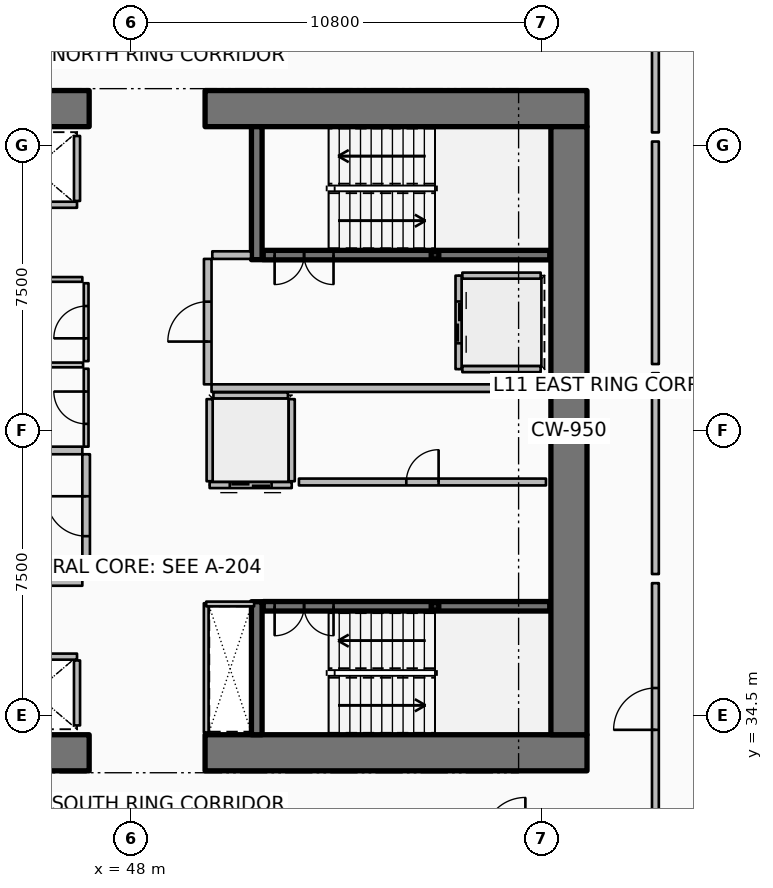
"""IFC4 building model, lengths in metres.
Left out: names, types, materials, properties, quantities, classifications, styles, units other than length and angle.
Written with IfcOpenShell. Run it as: python <this file> out.ifc"""

import sys

from ifc_helpers import new_model, si_unit, direction, frame, frame_2d, origin, origin_2d, place, context, subcontext, project, spatial, rectangle, hollow_rectangle, extrude, element, fill, save


model = new_model("IFC4")
c1 = context("Model", 3, precision=1e-05, world=origin(), true_north=direction((0.0, 1.0)))
c2 = subcontext(c1, "Body", "Model", "MODEL_VIEW")
j1 = project(units=[si_unit("LENGTHUNIT", "METRE"), si_unit("PLANEANGLEUNIT", "RADIAN")], contexts=[c1])
p1 = place(None, origin())
s1 = spatial("IfcSite", under=j1, at=p1, CompositionType="ELEMENT")
p2 = place(p1, origin())
s2 = spatial("IfcBuilding", under=s1, at=p2, CompositionType="ELEMENT")
p3 = place(p2, frame((0.0, 0.0, 48.9)))
s3 = spatial("IfcBuildingStorey", under=s2, at=p3, CompositionType="ELEMENT", Elevation=48.9)
p4 = place(p3, frame((36.85, 33.525, 0.0), z_axis=(0.0, 0.0, 1.0), x_axis=(1.0, 0.0, 0.0)))
e1 = element("IfcWall", 1, at=p4, inside=s3, PredefinedType="SHEAR", context=c2, shape_type="SweptSolid", body=[
    extrude(rectangle(XDim=10.05, YDim=0.95, at=frame_2d((5.025, 0.0))), origin(), (0.0, 0.0, 1.0), 3.75),
])
p5 = place(p3, frame((49.95, 33.525, 0.0), z_axis=(0.0, 0.0, 1.0), x_axis=(1.0, 0.0, 0.0)))
e2 = element("IfcWall", 2, at=p5, inside=s3, PredefinedType="SHEAR", context=c2, shape_type="SweptSolid", body=[
    extrude(rectangle(XDim=10.05, YDim=0.95, at=frame_2d((5.025, 0.0))), origin(), (0.0, 0.0, 1.0), 3.75),
])
p6 = place(p3, frame((36.85, 50.475, 0.0), z_axis=(0.0, 0.0, 1.0), x_axis=(1.0, 0.0, 0.0)))
e3 = element("IfcWall", 3, at=p6, inside=s3, PredefinedType="SHEAR", context=c2, shape_type="SweptSolid", body=[
    extrude(rectangle(XDim=10.05, YDim=0.95, at=frame_2d((5.025, 0.0))), origin(), (0.0, 0.0, 1.0), 3.75),
])
p7 = place(p3, frame((49.95, 50.475, 0.0), z_axis=(0.0, 0.0, 1.0), x_axis=(1.0, 0.0, 0.0)))
e4 = element("IfcWall", 4, at=p7, inside=s3, PredefinedType="SHEAR", context=c2, shape_type="SweptSolid", body=[
    extrude(rectangle(XDim=10.05, YDim=0.95, at=frame_2d((5.025, 0.0))), origin(), (0.0, 0.0, 1.0), 3.75),
])
p8 = place(p3, frame((59.525, 34.0, 0.0), z_axis=(0.0, 0.0, 1.0), x_axis=(0.0, 1.0, 0.0)))
e5 = element("IfcWall", 5, at=p8, inside=s3, PredefinedType="SHEAR", context=c2, shape_type="SweptSolid", body=[
    extrude(rectangle(XDim=16.0, YDim=0.95, at=frame_2d((8.0, 0.0))), origin(), (0.0, 0.0, 1.0), 3.75),
])
for number, where, z_axis, x_axis in (
    (6, (51.31, 46.5, 0.0), (0.0, 0.0, 1.0), (0.0, 1.0, 0.0)),
    (7, (51.31, 34.0, 0.0), (0.0, 0.0, 1.0), (0.0, 1.0, 0.0)),
):
    element("IfcWall", number, at=place(p3, frame(where, z_axis=z_axis, x_axis=x_axis)), inside=s3, PredefinedType="SHEAR", context=c2, shape_type="SweptSolid", body=[
        extrude(rectangle(XDim=3.5, YDim=0.28, at=frame_2d((1.75, 0.0))), origin(), (0.0, 0.0, 1.0), 3.75),
    ])
for number, where, z_axis, x_axis in (
    (8, (56.0, 46.62, 0.0), (0.0, 0.0, 1.0), (1.0, 0.0, 0.0)),
    (9, (56.0, 37.38, 0.0), (0.0, 0.0, 1.0), (1.0, 0.0, 0.0)),
):
    element("IfcColumn", number, at=place(p3, frame(where, z_axis=z_axis, x_axis=x_axis)), inside=s3, PredefinedType="COLUMN", context=c2, shape_type="SweptSolid", body=[
        extrude(hollow_rectangle(XDim=0.2, YDim=0.2, WallThickness=0.01, InnerFilletRadius=0.01, OuterFilletRadius=0.02, at=origin_2d()), origin(), (0.0, 0.0, 1.0), 1.67),
    ])
p9 = place(p3, frame((51.48, 46.62, 0.0), z_axis=(0.0, 0.0, 1.0), x_axis=(1.0, 0.0, 0.0)))
e10 = element("IfcWall", 10, at=p9, inside=s3, PredefinedType="SOLIDWALL", context=c2, shape_type="SweptSolid", body=[
    extrude(rectangle(XDim=7.54, YDim=0.25, at=frame_2d((3.77, 0.0))), origin(), (0.0, 0.0, 1.0), 3.5),
])
p10 = place(p9, frame((0.3, 0.0, 0.0)))
e11 = element("IfcOpeningElement", 11, at=p10, cuts=e10, PredefinedType="OPENING", context=c2, shape_type="SweptSolid", body=[
    extrude(rectangle(XDim=1.55, YDim=2.15, at=frame_2d((0.775, 1.075))), frame((0.0, 0.135, 0.0), z_axis=(0.0, -1.0, 0.0), x_axis=(1.0, 0.0, 0.0)), (0.0, 0.0, 1.0), 0.27),
])
p11 = place(p3, frame((51.48, 37.38, 0.0), z_axis=(0.0, 0.0, 1.0), x_axis=(1.0, 0.0, 0.0)))
e12 = element("IfcWall", 12, at=p11, inside=s3, PredefinedType="SOLIDWALL", context=c2, shape_type="SweptSolid", body=[
    extrude(rectangle(XDim=7.54, YDim=0.25, at=frame_2d((3.77, 0.0))), origin(), (0.0, 0.0, 1.0), 3.5),
])
p12 = place(p11, frame((0.3, 0.0, 0.0)))
e13 = element("IfcOpeningElement", 13, at=p12, cuts=e12, PredefinedType="OPENING", context=c2, shape_type="SweptSolid", body=[
    extrude(rectangle(XDim=1.55, YDim=2.15, at=frame_2d((0.775, 1.075))), frame((0.0, 0.135, 0.0), z_axis=(0.0, -1.0, 0.0), x_axis=(1.0, 0.0, 0.0)), (0.0, 0.0, 1.0), 0.27),
])
p13 = place(p3, frame((46.58, 47.945, 0.0), z_axis=(0.0, 0.0, 1.0), x_axis=(-1.0, 0.0, 0.0)))
e14 = element("IfcWall", 14, at=p13, inside=s3, PredefinedType="PARTITIONING", context=c2, shape_type="SweptSolid", body=[
    extrude(rectangle(XDim=2.26, YDim=0.16, at=frame_2d((1.13, 0.0))), origin(), (0.0, 0.0, 1.0), 3.5),
])
p14 = place(p3, frame((46.58, 48.045, 0.0), z_axis=(0.0, 0.0, 1.0), x_axis=(0.0, 1.0, 0.0)))
e15 = element("IfcWall", 15, at=p14, inside=s3, PredefinedType="PARTITIONING", context=c2, shape_type="SweptSolid", body=[
    extrude(rectangle(XDim=1.71, YDim=0.16, at=frame_2d((0.855, 0.0))), origin(), (0.0, 0.0, 1.0), 3.5),
])
p15 = place(p3, frame((44.32, 36.055, 0.0), z_axis=(0.0, 0.0, 1.0), x_axis=(1.0, 0.0, 0.0)))
e16 = element("IfcWall", 16, at=p15, inside=s3, PredefinedType="PARTITIONING", context=c2, shape_type="SweptSolid", body=[
    extrude(rectangle(XDim=2.26, YDim=0.16, at=frame_2d((1.13, 0.0))), origin(), (0.0, 0.0, 1.0), 3.5),
])
p16 = place(p3, frame((46.58, 34.245, 0.0), z_axis=(0.0, 0.0, 1.0), x_axis=(0.0, 1.0, 0.0)))
e17 = element("IfcWall", 17, at=p16, inside=s3, PredefinedType="PARTITIONING", context=c2, shape_type="SweptSolid", body=[
    extrude(rectangle(XDim=1.71, YDim=0.16, at=frame_2d((0.855, 0.0))), origin(), (0.0, 0.0, 1.0), 3.5),
])
p17 = place(p3, frame((56.62, 46.08, 0.0), z_axis=(0.0, 0.0, 1.0), x_axis=(0.0, -1.0, 0.0)))
e18 = element("IfcWall", 18, at=p17, inside=s3, PredefinedType="PARTITIONING", context=c2, shape_type="SweptSolid", body=[
    extrude(rectangle(XDim=2.46, YDim=0.16, at=frame_2d((1.23, 0.0))), origin(), (0.0, 0.0, 1.0), 3.5),
])
p18 = place(p17, frame((0.68, 0.0, 0.0)))
e19 = element("IfcOpeningElement", 19, at=p18, cuts=e18, PredefinedType="OPENING", context=c2, shape_type="SweptSolid", body=[
    extrude(rectangle(XDim=1.1, YDim=2.1, at=frame_2d((0.55, 1.05))), frame((0.0, 0.09, 0.0), z_axis=(0.0, -1.0, 0.0), x_axis=(1.0, 0.0, 0.0)), (0.0, 0.0, 1.0), 0.18),
])
for number, where, z_axis, x_axis in (
    (20, (56.72, 46.08, 0.0), (0.0, 0.0, 1.0), (1.0, 0.0, 0.0)),
    (21, (56.72, 43.62, 0.0), (0.0, 0.0, 1.0), (1.0, 0.0, 0.0)),
):
    element("IfcWall", number, at=place(p3, frame(where, z_axis=z_axis, x_axis=x_axis)), inside=s3, PredefinedType="PARTITIONING", context=c2, shape_type="SweptSolid", body=[
        extrude(rectangle(XDim=2.06, YDim=0.16, at=frame_2d((1.03, 0.0))), origin(), (0.0, 0.0, 1.0), 3.5),
    ])
p19 = place(p3, frame((52.23, 40.57, 0.0), z_axis=(0.0, 0.0, 1.0), x_axis=(-1.0, 0.0, 0.0)))
e22 = element("IfcWall", 22, at=p19, inside=s3, PredefinedType="PARTITIONING", context=c2, shape_type="SweptSolid", body=[
    extrude(rectangle(XDim=2.16, YDim=0.16, at=frame_2d((1.08, 0.0))), origin(), (0.0, 0.0, 1.0), 3.5),
])
p20 = place(p19, frame((0.53, 0.0, 0.0)))
e23 = element("IfcOpeningElement", 23, at=p20, cuts=e22, PredefinedType="OPENING", context=c2, shape_type="SweptSolid", body=[
    extrude(rectangle(XDim=1.1, YDim=2.1, at=frame_2d((0.55, 1.05))), frame((0.0, 0.09, 0.0), z_axis=(0.0, -1.0, 0.0), x_axis=(1.0, 0.0, 0.0)), (0.0, 0.0, 1.0), 0.18),
])
for number, where, z_axis, x_axis in (
    (24, (52.23, 40.67, 0.0), (0.0, 0.0, 1.0), (0.0, 1.0, 0.0)),
    (25, (50.07, 40.67, 0.0), (0.0, 0.0, 1.0), (0.0, 1.0, 0.0)),
):
    element("IfcWall", number, at=place(p3, frame(where, z_axis=z_axis, x_axis=x_axis)), inside=s3, PredefinedType="PARTITIONING", context=c2, shape_type="SweptSolid", body=[
        extrude(rectangle(XDim=2.16, YDim=0.16, at=frame_2d((1.08, 0.0))), origin(), (0.0, 0.0, 1.0), 3.5),
    ])
p21 = place(p3, frame((50.17, 42.93, 0.0), z_axis=(0.0, 0.0, 1.0), x_axis=(1.0, 0.0, 0.0)))
e26 = element("IfcWall", 26, at=p21, inside=s3, PredefinedType="PARTITIONING", context=c2, shape_type="SweptSolid", body=[
    extrude(rectangle(XDim=1.96, YDim=0.16, at=frame_2d((0.98, 0.0))), origin(), (0.0, 0.0, 1.0), 3.5),
])
p22 = place(p3, frame((52.42, 40.65, 0.0), z_axis=(0.0, 0.0, 1.0), x_axis=(1.0, 0.0, 0.0)))
e27 = element("IfcWall", 27, at=p22, inside=s3, PredefinedType="PARTITIONING", context=c2, shape_type="SweptSolid", body=[
    extrude(rectangle(XDim=6.5, YDim=0.18, at=frame_2d((3.25, 0.0))), origin(), (0.0, 0.0, 1.0), 3.5),
])
p23 = place(p22, frame((2.825, 0.0, 0.0)))
e28 = element("IfcOpeningElement", 28, at=p23, cuts=e27, PredefinedType="OPENING", context=c2, shape_type="SweptSolid", body=[
    extrude(rectangle(XDim=0.85, YDim=2.06, at=frame_2d((0.425, 1.03))), frame((0.0, 0.1, 0.0), z_axis=(0.0, -1.0, 0.0), x_axis=(1.0, 0.0, 0.0)), (0.0, 0.0, 1.0), 0.2),
])
p24 = place(p3, frame((41.35, 38.02, 0.0), z_axis=(0.0, 0.0, 1.0), x_axis=(1.0, 0.0, 0.0)))
e29 = element("IfcWall", 29, at=p24, inside=s3, PredefinedType="PARTITIONING", context=c2, shape_type="SweptSolid", body=[
    extrude(rectangle(XDim=5.37, YDim=0.2, at=frame_2d((2.685, 0.0))), origin(), (0.0, 0.0, 1.0), 3.5),
])
p25 = place(p3, frame((43.92, 41.48, 0.0), z_axis=(0.0, 0.0, 1.0), x_axis=(1.0, 0.0, 0.0)))
e30 = element("IfcWall", 30, at=p25, inside=s3, PredefinedType="PARTITIONING", context=c2, shape_type="SweptSolid", body=[
    extrude(rectangle(XDim=2.8, YDim=0.2, at=frame_2d((1.4, 0.0))), origin(), (0.0, 0.0, 1.0), 3.5),
])
p26 = place(p3, frame((46.82, 38.12, 0.0), z_axis=(0.0, 0.0, 1.0), x_axis=(0.0, 1.0, 0.0)))
e31 = element("IfcWall", 31, at=p26, inside=s3, PredefinedType="PARTITIONING", context=c2, shape_type="SweptSolid", body=[
    extrude(rectangle(XDim=3.26, YDim=0.2, at=frame_2d((1.63, 0.0))), origin(), (0.0, 0.0, 1.0), 3.5),
])
p27 = place(p26, frame((1.105, 0.0, 0.0)))
e32 = element("IfcOpeningElement", 32, at=p27, cuts=e31, PredefinedType="OPENING", context=c2, shape_type="SweptSolid", body=[
    extrude(rectangle(XDim=1.05, YDim=2.1, at=frame_2d((0.525, 1.05))), frame((0.0, 0.11, 0.0), z_axis=(0.0, -1.0, 0.0), x_axis=(1.0, 0.0, 0.0)), (0.0, 0.0, 1.0), 0.22),
])
p28 = place(p3, frame((50.12, 43.12, 0.0), z_axis=(0.0, 0.0, 1.0), x_axis=(1.0, 0.0, 0.0)))
e33 = element("IfcWall", 33, at=p28, inside=s3, PredefinedType="PARTITIONING", context=c2, shape_type="SweptSolid", body=[
    extrude(rectangle(XDim=8.88, YDim=0.2, at=frame_2d((4.44, 0.0))), origin(), (0.0, 0.0, 1.0), 3.5),
])
p29 = place(p3, frame((50.14, 46.62, 0.0), z_axis=(0.0, 0.0, 1.0), x_axis=(1.0, 0.0, 0.0)))
e34 = element("IfcWall", 34, at=p29, inside=s3, PredefinedType="PARTITIONING", context=c2, shape_type="SweptSolid", body=[
    extrude(rectangle(XDim=1.02, YDim=0.2, at=frame_2d((0.51, 0.0))), origin(), (0.0, 0.0, 1.0), 3.5),
])
p30 = place(p3, frame((50.02, 43.22, 0.0), z_axis=(0.0, 0.0, 1.0), x_axis=(0.0, 1.0, 0.0)))
e35 = element("IfcWall", 35, at=p30, inside=s3, PredefinedType="PARTITIONING", context=c2, shape_type="SweptSolid", body=[
    extrude(rectangle(XDim=3.3, YDim=0.2, at=frame_2d((1.65, 0.0))), origin(), (0.0, 0.0, 1.0), 3.5),
])
p31 = place(p30, frame((1.125, 0.0, 0.0)))
e36 = element("IfcOpeningElement", 36, at=p31, cuts=e35, PredefinedType="OPENING", context=c2, shape_type="SweptSolid", body=[
    extrude(rectangle(XDim=1.05, YDim=2.1, at=frame_2d((0.525, 1.05))), frame((0.0, 0.11, 0.0), z_axis=(0.0, -1.0, 0.0), x_axis=(1.0, 0.0, 0.0)), (0.0, 0.0, 1.0), 0.22),
])
p32 = place(p3, frame((41.36, 45.98, 0.0), z_axis=(0.0, 0.0, 1.0), x_axis=(1.0, 0.0, 0.0)))
e37 = element("IfcWall", 37, at=p32, inside=s3, PredefinedType="PARTITIONING", context=c2, shape_type="SweptSolid", body=[
    extrude(rectangle(XDim=5.36, YDim=0.125, at=frame_2d((2.68, 0.0))), origin(), (0.0, 0.0, 1.0), 2.94),
])
p33 = place(p3, frame((49.98, 34.06, 0.0), z_axis=(0.0, 0.0, 1.0), x_axis=(0.0, 1.0, 0.0)))
e38 = element("IfcWall", 38, at=p33, inside=s3, PredefinedType="PARTITIONING", context=c2, shape_type="SweptSolid", body=[
    extrude(rectangle(XDim=3.4, YDim=0.125, at=frame_2d((1.7, 0.0))), origin(), (0.0, 0.0, 1.0), 2.94),
])
p34 = place(p3, frame((49.98, 37.44, 0.0), z_axis=(0.0, 0.0, 1.0), x_axis=(1.0, 0.0, 0.0)))
e39 = element("IfcWall", 39, at=p34, inside=s3, PredefinedType="PARTITIONING", context=c2, shape_type="SweptSolid", body=[
    extrude(rectangle(XDim=1.26, YDim=0.125, at=frame_2d((0.63, 0.0))), origin(), (0.0, 0.0, 1.0), 2.94),
])
p35 = place(p3, frame((44.03, 43.73, 0.0), z_axis=(0.0, 0.0, 1.0), x_axis=(1.0, 0.0, 0.0)))
e40 = element("IfcWall", 40, at=p35, inside=s3, PredefinedType="PARTITIONING", context=c2, shape_type="SweptSolid", body=[
    extrude(rectangle(XDim=2.71, YDim=0.125, at=frame_2d((1.355, 0.0))), origin(), (0.0, 0.0, 1.0), 2.94),
])
p36 = place(p3, frame((46.82, 41.58, 0.0), z_axis=(0.0, 0.0, 1.0), x_axis=(0.0, 1.0, 0.0)))
e41 = element("IfcWall", 41, at=p36, inside=s3, PredefinedType="PARTITIONING", context=c2, shape_type="SweptSolid", body=[
    extrude(rectangle(XDim=2.05, YDim=0.125, at=frame_2d((1.025, 0.0))), origin(), (0.0, 0.0, 1.0), 2.94),
])
p37 = place(p36, frame((0.6, 0.0, 0.0)))
e42 = element("IfcOpeningElement", 42, at=p37, cuts=e41, PredefinedType="OPENING", context=c2, shape_type="SweptSolid", body=[
    extrude(rectangle(XDim=0.85, YDim=2.06, at=frame_2d((0.425, 1.03))), frame((0.0, 0.073, 0.0), z_axis=(0.0, -1.0, 0.0), x_axis=(1.0, 0.0, 0.0)), (0.0, 0.0, 1.0), 0.145),
])
p38 = place(p3, frame((46.82, 43.83, 0.0), z_axis=(0.0, 0.0, 1.0), x_axis=(0.0, 1.0, 0.0)))
e43 = element("IfcWall", 43, at=p38, inside=s3, PredefinedType="PARTITIONING", context=c2, shape_type="SweptSolid", body=[
    extrude(rectangle(XDim=2.05, YDim=0.125, at=frame_2d((1.025, 0.0))), origin(), (0.0, 0.0, 1.0), 2.94),
])
p39 = place(p38, frame((0.6, 0.0, 0.0)))
e44 = element("IfcOpeningElement", 44, at=p39, cuts=e43, PredefinedType="OPENING", context=c2, shape_type="SweptSolid", body=[
    extrude(rectangle(XDim=0.85, YDim=2.06, at=frame_2d((0.425, 1.03))), frame((0.0, 0.073, 0.0), z_axis=(0.0, -1.0, 0.0), x_axis=(1.0, 0.0, 0.0)), (0.0, 0.0, 1.0), 0.145),
])
p40 = place(p3, frame((61.8, 31.37, 0.0), z_axis=(0.0, 0.0, 1.0), x_axis=(0.0, 1.0, 0.0)))
e45 = element("IfcWall", 45, at=p40, inside=s3, PredefinedType="PARTITIONING", context=c2, shape_type="SweptSolid", body=[
    extrude(rectangle(XDim=6.618, YDim=0.18, at=frame_2d((3.309, 0.0))), origin(), (0.0, 0.0, 1.0), 2.867),
])
p41 = place(p40, frame((2.759, 0.0, 0.0)))
e46 = element("IfcOpeningElement", 46, at=p41, cuts=e45, PredefinedType="OPENING", context=c2, shape_type="SweptSolid", body=[
    extrude(rectangle(XDim=1.1, YDim=2.1, at=frame_2d((0.55, 1.05))), frame((0.0, 0.1, 0.0), z_axis=(0.0, -1.0, 0.0), x_axis=(1.0, 0.0, 0.0)), (0.0, 0.0, 1.0), 0.2),
])
p42 = place(p3, frame((61.8, 38.228, 0.0), z_axis=(0.0, 0.0, 1.0), x_axis=(0.0, 1.0, 0.0)))
e47 = element("IfcWall", 47, at=p42, inside=s3, PredefinedType="PARTITIONING", context=c2, shape_type="SweptSolid", body=[
    extrude(rectangle(XDim=5.285, YDim=0.18, at=frame_2d((2.643, 0.0))), origin(), (0.0, 0.0, 1.0), 2.867),
])
p43 = place(p3, frame((61.8, 43.753, 0.0), z_axis=(0.0, 0.0, 1.0), x_axis=(0.0, 1.0, 0.0)))
e48 = element("IfcWall", 48, at=p43, inside=s3, PredefinedType="PARTITIONING", context=c2, shape_type="SweptSolid", body=[
    extrude(rectangle(XDim=5.855, YDim=0.18, at=frame_2d((2.927, 0.0))), origin(), (0.0, 0.0, 1.0), 2.867),
])
p44 = place(p3, frame((61.8, 49.848, 0.0), z_axis=(0.0, 0.0, 1.0), x_axis=(0.0, 1.0, 0.0)))
e49 = element("IfcWall", 49, at=p44, inside=s3, PredefinedType="PARTITIONING", context=c2, shape_type="SweptSolid", body=[
    extrude(rectangle(XDim=2.781, YDim=0.18, at=frame_2d((1.391, 0.0))), origin(), (0.0, 0.0, 1.0), 2.867),
])
p45 = place(p10, origin())
e50 = element("IfcDoor", 50, at=p45, inside=s3, OperationType="DOUBLE_DOOR_SINGLE_SWING", PredefinedType="DOOR", context=c2, shape_type="SweptSolid", body=[
    extrude(rectangle(XDim=1.55, YDim=2.15, at=frame_2d((0.775, 1.075))), frame((0.0, 0.025, 0.0), z_axis=(0.0, -1.0, 0.0), x_axis=(1.0, 0.0, 0.0)), (0.0, 0.0, 1.0), 0.05),
])
fill(e11, e50)
p46 = place(p12, origin())
e51 = element("IfcDoor", 51, at=p46, inside=s3, OperationType="DOUBLE_DOOR_SINGLE_SWING", PredefinedType="DOOR", context=c2, shape_type="SweptSolid", body=[
    extrude(rectangle(XDim=1.55, YDim=2.15, at=frame_2d((0.775, 1.075))), frame((0.0, 0.025, 0.0), z_axis=(0.0, -1.0, 0.0), x_axis=(1.0, 0.0, 0.0)), (0.0, 0.0, 1.0), 0.05),
])
fill(e13, e51)
p47 = place(p18, origin())
e52 = element("IfcDoor", 52, at=p47, inside=s3, OperationType="DOUBLE_DOOR_SLIDING", PredefinedType="DOOR", context=c2, shape_type="SweptSolid", body=[
    extrude(rectangle(XDim=1.1, YDim=2.1, at=frame_2d((0.55, 1.05))), frame((0.0, 0.025, 0.0), z_axis=(0.0, -1.0, 0.0), x_axis=(1.0, 0.0, 0.0)), (0.0, 0.0, 1.0), 0.05),
])
fill(e19, e52)
p48 = place(p20, origin())
e53 = element("IfcDoor", 53, at=p48, inside=s3, OperationType="DOUBLE_DOOR_SLIDING", PredefinedType="DOOR", context=c2, shape_type="SweptSolid", body=[
    extrude(rectangle(XDim=1.1, YDim=2.1, at=frame_2d((0.55, 1.05))), frame((0.0, 0.025, 0.0), z_axis=(0.0, -1.0, 0.0), x_axis=(1.0, 0.0, 0.0)), (0.0, 0.0, 1.0), 0.05),
])
fill(e23, e53)
p49 = place(p23, origin())
e54 = element("IfcDoor", 54, at=p49, inside=s3, OperationType="SINGLE_SWING_RIGHT", PredefinedType="DOOR", context=c2, shape_type="SweptSolid", body=[
    extrude(rectangle(XDim=0.85, YDim=2.06, at=frame_2d((0.425, 1.03))), frame((0.0, 0.025, 0.0), z_axis=(0.0, -1.0, 0.0), x_axis=(1.0, 0.0, 0.0)), (0.0, 0.0, 1.0), 0.05),
])
fill(e28, e54)
p50 = place(p27, origin())
e55 = element("IfcDoor", 55, at=p50, inside=s3, OperationType="SINGLE_SWING_RIGHT", PredefinedType="DOOR", context=c2, shape_type="SweptSolid", body=[
    extrude(rectangle(XDim=1.05, YDim=2.1, at=frame_2d((0.525, 1.05))), frame((0.0, 0.025, 0.0), z_axis=(0.0, -1.0, 0.0), x_axis=(1.0, 0.0, 0.0)), (0.0, 0.0, 1.0), 0.05),
])
fill(e32, e55)
p51 = place(p31, origin())
e56 = element("IfcDoor", 56, at=p51, inside=s3, OperationType="SINGLE_SWING_LEFT", PredefinedType="DOOR", context=c2, shape_type="SweptSolid", body=[
    extrude(rectangle(XDim=1.05, YDim=2.1, at=frame_2d((0.525, 1.05))), frame((0.0, 0.025, 0.0), z_axis=(0.0, -1.0, 0.0), x_axis=(1.0, 0.0, 0.0)), (0.0, 0.0, 1.0), 0.05),
])
fill(e36, e56)
p52 = place(p37, origin())
e57 = element("IfcDoor", 57, at=p52, inside=s3, OperationType="SINGLE_SWING_RIGHT", PredefinedType="DOOR", context=c2, shape_type="SweptSolid", body=[
    extrude(rectangle(XDim=0.85, YDim=2.06, at=frame_2d((0.425, 1.03))), frame((0.0, 0.025, 0.0), z_axis=(0.0, -1.0, 0.0), x_axis=(1.0, 0.0, 0.0)), (0.0, 0.0, 1.0), 0.05),
])
fill(e42, e57)
p53 = place(p39, origin())
e58 = element("IfcDoor", 58, at=p53, inside=s3, OperationType="SINGLE_SWING_LEFT", PredefinedType="DOOR", context=c2, shape_type="SweptSolid", body=[
    extrude(rectangle(XDim=0.85, YDim=2.06, at=frame_2d((0.425, 1.03))), frame((0.0, 0.025, 0.0), z_axis=(0.0, -1.0, 0.0), x_axis=(1.0, 0.0, 0.0)), (0.0, 0.0, 1.0), 0.05),
])
fill(e44, e58)
p54 = place(p41, origin())
e59 = element("IfcDoor", 59, at=p54, inside=s3, OperationType="SINGLE_SWING_LEFT", PredefinedType="DOOR", context=c2, shape_type="SweptSolid", body=[
    extrude(rectangle(XDim=1.1, YDim=2.1, at=frame_2d((0.55, 1.05))), frame((0.0, 0.025, 0.0), z_axis=(0.0, -1.0, 0.0), x_axis=(1.0, 0.0, 0.0)), (0.0, 0.0, 1.0), 0.05),
])
fill(e46, e59)
save(model, sys.argv[1])
